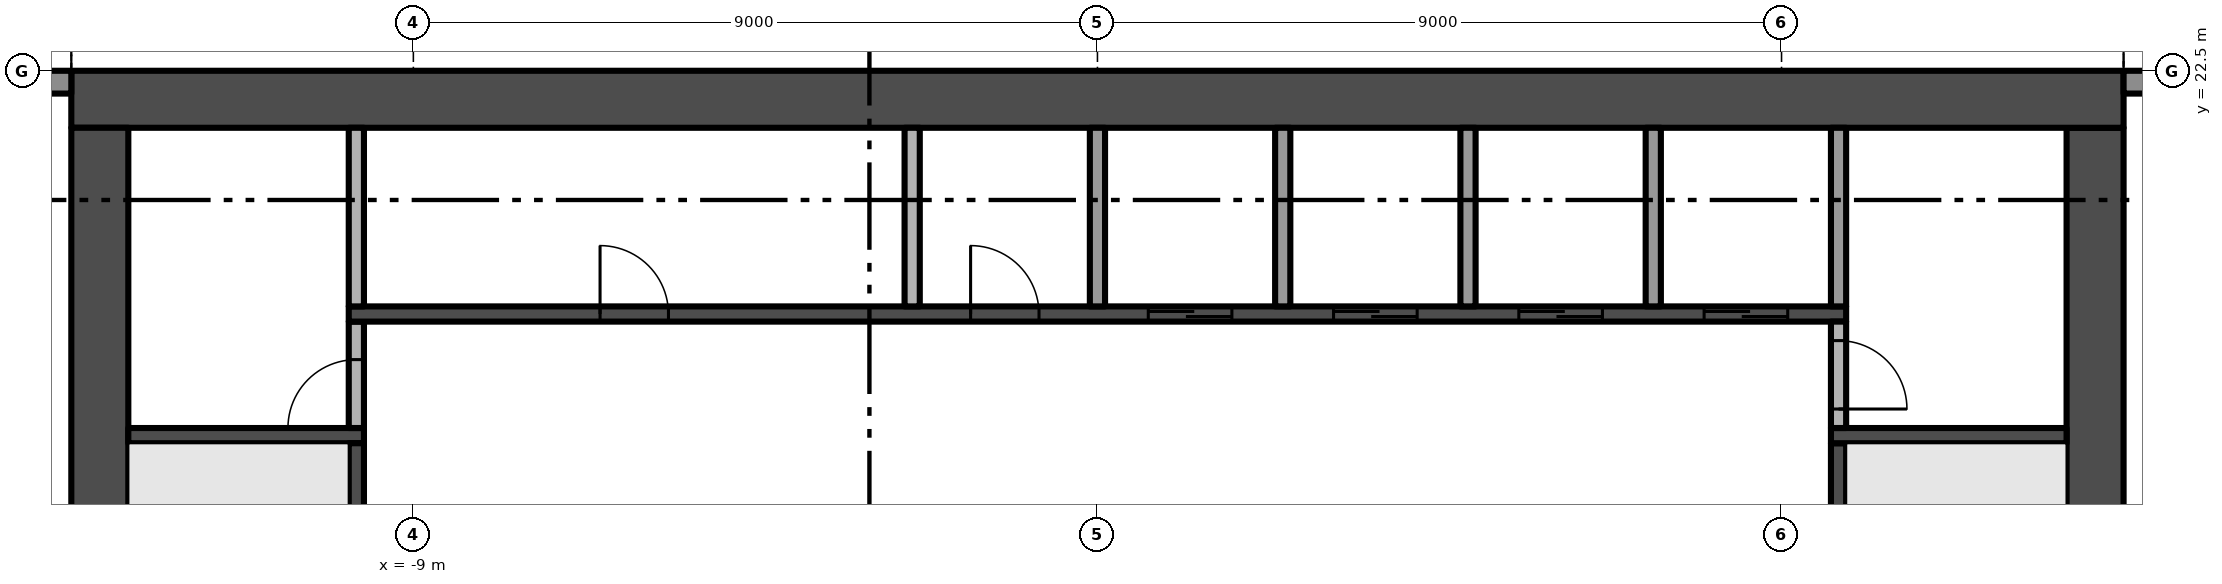
"""IFC4 building model, lengths in metres.
Left out: names, types, materials, properties, quantities, classifications, styles, units other than length and angle.
Written with IfcOpenShell. Run it as: python <this file> out.ifc"""

import sys

from ifc_helpers import new_model, si_unit, direction, frame, frame_2d, origin, place, context, subcontext, project, spatial, rectangle, extrude, element, fill, save


model = new_model("IFC4")
c1 = context("Model", 3, precision=1e-05, world=origin(), true_north=direction((0.0, 1.0)))
c2 = subcontext(c1, "Body", "Model", "MODEL_VIEW")
j1 = project(units=[si_unit("LENGTHUNIT", "METRE"), si_unit("PLANEANGLEUNIT", "RADIAN")], contexts=[c1])
p1 = place(None, origin())
s1 = spatial("IfcSite", under=j1, at=p1, CompositionType="ELEMENT")
p2 = place(p1, origin())
s2 = spatial("IfcBuilding", under=s1, at=p2, CompositionType="ELEMENT")
p3 = place(p2, frame((0.0, 0.0, 174.4)))
s3 = spatial("IfcBuildingStorey", under=s2, at=p3, CompositionType="ELEMENT", Elevation=174.4)
p4 = place(p3, frame((13.125, 5.25, -0.3), z_axis=(0.0, 0.0, 1.0), x_axis=(0.0, 1.0, 0.0)))
e1 = element("IfcWall", 1, at=p4, inside=s3, PredefinedType="SHEAR", context=c2, shape_type="SweptSolid", body=[
    extrude(rectangle(XDim=16.5, YDim=0.75, at=frame_2d((8.25, 0.0))), origin(), (0.0, 0.0, 1.0), 5.0),
])
p5 = place(p4, frame((6.15, 0.0, 0.3)))
e2 = element("IfcOpeningElement", 2, at=p5, cuts=e1, PredefinedType="OPENING", context=c2, shape_type="SweptSolid", body=[
    extrude(rectangle(XDim=1.2, YDim=2.2, at=frame_2d((0.6, 1.1))), frame((0.0, 0.385, 0.0), z_axis=(0.0, -1.0, 0.0), x_axis=(1.0, 0.0, 0.0)), (0.0, 0.0, 1.0), 0.77),
])
p6 = place(p3, frame((13.5, 22.125, -0.3), z_axis=(0.0, 0.0, 1.0), x_axis=(-1.0, 0.0, 0.0)))
e3 = element("IfcWall", 3, at=p6, inside=s3, PredefinedType="SHEAR", context=c2, shape_type="SweptSolid", body=[
    extrude(rectangle(XDim=27.0, YDim=0.75, at=frame_2d((13.5, 0.0))), origin(), (0.0, 0.0, 1.0), 5.0),
])
p7 = place(p3, frame((-13.125, 21.75, -0.3), z_axis=(0.0, 0.0, 1.0), x_axis=(0.0, -1.0, 0.0)))
e4 = element("IfcWall", 4, at=p7, inside=s3, PredefinedType="SHEAR", context=c2, shape_type="SweptSolid", body=[
    extrude(rectangle(XDim=16.5, YDim=0.75, at=frame_2d((8.25, 0.0))), origin(), (0.0, 0.0, 1.0), 5.0),
])
p8 = place(p7, frame((9.15, 0.0, 0.3)))
e5 = element("IfcOpeningElement", 5, at=p8, cuts=e4, PredefinedType="OPENING", context=c2, shape_type="SweptSolid", body=[
    extrude(rectangle(XDim=1.2, YDim=2.2, at=frame_2d((0.6, 1.1))), frame((0.0, 0.385, 0.0), z_axis=(0.0, -1.0, 0.0), x_axis=(1.0, 0.0, 0.0)), (0.0, 0.0, 1.0), 0.77),
])
p9 = place(p3, frame((13.5, 22.35, 0.0), z_axis=(0.0, 0.0, 1.0), x_axis=(1.0, 0.0, 0.0)))
e6 = element("IfcWall", 6, at=p9, inside=s3, PredefinedType="SOLIDWALL", context=c2, shape_type="SweptSolid", body=[
    extrude(rectangle(XDim=3.4, YDim=0.3, at=frame_2d((1.7, 0.0))), origin(), (0.0, 0.0, 1.0), 4.7),
])
p10 = place(p9, frame((0.65, 0.0, 0.0)))
e7 = element("IfcOpeningElement", 7, at=p10, cuts=e6, PredefinedType="OPENING", context=c2, shape_type="SweptSolid", body=[
    extrude(rectangle(XDim=2.45, YDim=2.4, at=frame_2d((1.225, 1.2))), frame((0.0, 0.16, 0.0), z_axis=(0.0, -1.0, 0.0), x_axis=(1.0, 0.0, 0.0)), (0.0, 0.0, 1.0), 0.32),
])
p11 = place(p3, frame((-16.9, 22.35, 0.0), z_axis=(0.0, 0.0, 1.0), x_axis=(1.0, 0.0, 0.0)))
e8 = element("IfcWall", 8, at=p11, inside=s3, PredefinedType="SOLIDWALL", context=c2, shape_type="SweptSolid", body=[
    extrude(rectangle(XDim=3.4, YDim=0.3, at=frame_2d((1.7, 0.0))), origin(), (0.0, 0.0, 1.0), 4.7),
])
p12 = place(p11, frame((0.3, 0.0, 0.0)))
e9 = element("IfcOpeningElement", 9, at=p12, cuts=e8, PredefinedType="OPENING", context=c2, shape_type="SweptSolid", body=[
    extrude(rectangle(XDim=2.45, YDim=2.4, at=frame_2d((1.225, 1.2))), frame((0.0, 0.16, 0.0), z_axis=(0.0, -1.0, 0.0), x_axis=(1.0, 0.0, 0.0)), (0.0, 0.0, 1.0), 0.32),
])
p13 = place(p3, frame((-12.75, 17.7, 0.0), z_axis=(0.0, 0.0, 1.0), x_axis=(1.0, 0.0, 0.0)))
e10 = element("IfcWall", 10, at=p13, inside=s3, PredefinedType="SHEAR", context=c2, shape_type="SweptSolid", body=[
    extrude(rectangle(XDim=3.1, YDim=0.2, at=frame_2d((1.55, 0.0))), origin(), (0.0, 0.0, 1.0), 4.7),
])
p14 = place(p3, frame((-9.75, 16.1, 0.0), z_axis=(0.0, 0.0, 1.0), x_axis=(0.0, 1.0, 0.0)))
e11 = element("IfcWall", 11, at=p14, inside=s3, PredefinedType="SHEAR", context=c2, shape_type="SweptSolid", body=[
    extrude(rectangle(XDim=1.5, YDim=0.2, at=frame_2d((0.75, 0.0))), origin(), (0.0, 0.0, 1.0), 4.7),
])
p15 = place(p3, frame((-9.75, 17.8, 0.0), z_axis=(0.0, 0.0, 1.0), x_axis=(0.0, 1.0, 0.0)))
e12 = element("IfcWall", 12, at=p15, inside=s3, PredefinedType="PARTITIONING", context=c2, shape_type="SweptSolid", body=[
    extrude(rectangle(XDim=1.4, YDim=0.2, at=frame_2d((0.7, 0.0))), origin(), (0.0, 0.0, 1.0), 4.7),
])
p16 = place(p15, origin())
e13 = element("IfcOpeningElement", 13, at=p16, cuts=e12, PredefinedType="OPENING", context=c2, shape_type="SweptSolid", body=[
    extrude(rectangle(XDim=0.9, YDim=2.1, at=frame_2d((0.45, 1.05))), frame((0.0, 0.11, 0.0), z_axis=(0.0, -1.0, 0.0), x_axis=(1.0, 0.0, 0.0)), (0.0, 0.0, 1.0), 0.22),
])
p17 = place(p3, frame((-9.85, 19.3, 0.0), z_axis=(0.0, 0.0, 1.0), x_axis=(1.0, 0.0, 0.0)))
e14 = element("IfcWall", 14, at=p17, inside=s3, PredefinedType="SHEAR", context=c2, shape_type="SweptSolid", body=[
    extrude(rectangle(XDim=19.7, YDim=0.2, at=frame_2d((9.85, 0.0))), origin(), (0.0, 0.0, 1.0), 4.7),
])
p18 = place(p17, frame((10.519, 0.0, 0.0)))
e15 = element("IfcOpeningElement", 15, at=p18, cuts=e14, PredefinedType="OPENING", context=c2, shape_type="SweptSolid", body=[
    extrude(rectangle(XDim=1.1, YDim=2.1, at=frame_2d((0.55, 1.05))), frame((0.0, 0.11, 0.0), z_axis=(0.0, -1.0, 0.0), x_axis=(1.0, 0.0, 0.0)), (0.0, 0.0, 1.0), 0.22),
])
p19 = place(p17, frame((12.956, 0.0, 0.0)))
e16 = element("IfcOpeningElement", 16, at=p19, cuts=e14, PredefinedType="OPENING", context=c2, shape_type="SweptSolid", body=[
    extrude(rectangle(XDim=1.1, YDim=2.1, at=frame_2d((0.55, 1.05))), frame((0.0, 0.11, 0.0), z_axis=(0.0, -1.0, 0.0), x_axis=(1.0, 0.0, 0.0)), (0.0, 0.0, 1.0), 0.22),
])
p20 = place(p17, frame((15.394, 0.0, 0.0)))
e17 = element("IfcOpeningElement", 17, at=p20, cuts=e14, PredefinedType="OPENING", context=c2, shape_type="SweptSolid", body=[
    extrude(rectangle(XDim=1.1, YDim=2.1, at=frame_2d((0.55, 1.05))), frame((0.0, 0.11, 0.0), z_axis=(0.0, -1.0, 0.0), x_axis=(1.0, 0.0, 0.0)), (0.0, 0.0, 1.0), 0.22),
])
p21 = place(p17, frame((17.831, 0.0, 0.0)))
e18 = element("IfcOpeningElement", 18, at=p21, cuts=e14, PredefinedType="OPENING", context=c2, shape_type="SweptSolid", body=[
    extrude(rectangle(XDim=1.1, YDim=2.1, at=frame_2d((0.55, 1.05))), frame((0.0, 0.11, 0.0), z_axis=(0.0, -1.0, 0.0), x_axis=(1.0, 0.0, 0.0)), (0.0, 0.0, 1.0), 0.22),
])
p22 = place(p17, frame((3.306, 0.0, 0.0)))
e19 = element("IfcOpeningElement", 19, at=p22, cuts=e14, PredefinedType="OPENING", context=c2, shape_type="SweptSolid", body=[
    extrude(rectangle(XDim=0.9, YDim=2.1, at=frame_2d((0.45, 1.05))), frame((0.0, 0.11, 0.0), z_axis=(0.0, -1.0, 0.0), x_axis=(1.0, 0.0, 0.0)), (0.0, 0.0, 1.0), 0.22),
])
p23 = place(p17, frame((8.181, 0.0, 0.0)))
e20 = element("IfcOpeningElement", 20, at=p23, cuts=e14, PredefinedType="OPENING", context=c2, shape_type="SweptSolid", body=[
    extrude(rectangle(XDim=0.9, YDim=2.1, at=frame_2d((0.45, 1.05))), frame((0.0, 0.11, 0.0), z_axis=(0.0, -1.0, 0.0), x_axis=(1.0, 0.0, 0.0)), (0.0, 0.0, 1.0), 0.22),
])
for number, where, z_axis, x_axis in (
    (21, (-9.75, 19.4, 0.0), (0.0, 0.0, 1.0), (0.0, 1.0, 0.0)),
    (22, (-2.438, 19.4, 0.0), (0.0, 0.0, 1.0), (0.0, 1.0, 0.0)),
    (23, (0.0, 19.4, 0.0), (0.0, 0.0, 1.0), (0.0, 1.0, 0.0)),
    (24, (2.438, 19.4, 0.0), (0.0, 0.0, 1.0), (0.0, 1.0, 0.0)),
    (25, (4.875, 19.4, 0.0), (0.0, 0.0, 1.0), (0.0, 1.0, 0.0)),
    (26, (7.312, 19.4, 0.0), (0.0, 0.0, 1.0), (0.0, 1.0, 0.0)),
):
    element("IfcWall", number, at=place(p3, frame(where, z_axis=z_axis, x_axis=x_axis)), inside=s3, PredefinedType="PARTITIONING", context=c2, shape_type="SweptSolid", body=[
        extrude(rectangle(XDim=2.35, YDim=0.2, at=frame_2d((1.175, 0.0))), origin(), (0.0, 0.0, 1.0), 4.7),
    ])
p24 = place(p3, frame((9.75, 16.1, 0.0), z_axis=(0.0, 0.0, 1.0), x_axis=(0.0, 1.0, 0.0)))
e27 = element("IfcWall", 27, at=p24, inside=s3, PredefinedType="SHEAR", context=c2, shape_type="SweptSolid", body=[
    extrude(rectangle(XDim=1.5, YDim=0.2, at=frame_2d((0.75, 0.0))), origin(), (0.0, 0.0, 1.0), 4.7),
])
p25 = place(p3, frame((9.65, 17.7, 0.0), z_axis=(0.0, 0.0, 1.0), x_axis=(1.0, 0.0, 0.0)))
e28 = element("IfcWall", 28, at=p25, inside=s3, PredefinedType="SHEAR", context=c2, shape_type="SweptSolid", body=[
    extrude(rectangle(XDim=3.1, YDim=0.2, at=frame_2d((1.55, 0.0))), origin(), (0.0, 0.0, 1.0), 4.7),
])
p26 = place(p3, frame((9.75, 19.2, 0.0), z_axis=(0.0, 0.0, 1.0), x_axis=(0.0, -1.0, 0.0)))
e29 = element("IfcWall", 29, at=p26, inside=s3, PredefinedType="PARTITIONING", context=c2, shape_type="SweptSolid", body=[
    extrude(rectangle(XDim=1.4, YDim=0.2, at=frame_2d((0.7, 0.0))), origin(), (0.0, 0.0, 1.0), 4.7),
])
p27 = place(p26, frame((0.25, 0.0, 0.0)))
e30 = element("IfcOpeningElement", 30, at=p27, cuts=e29, PredefinedType="OPENING", context=c2, shape_type="SweptSolid", body=[
    extrude(rectangle(XDim=0.9, YDim=2.1, at=frame_2d((0.45, 1.05))), frame((0.0, 0.11, 0.0), z_axis=(0.0, -1.0, 0.0), x_axis=(1.0, 0.0, 0.0)), (0.0, 0.0, 1.0), 0.22),
])
p28 = place(p3, frame((9.75, 19.4, 0.0), z_axis=(0.0, 0.0, 1.0), x_axis=(0.0, 1.0, 0.0)))
e31 = element("IfcWall", 31, at=p28, inside=s3, PredefinedType="PARTITIONING", context=c2, shape_type="SweptSolid", body=[
    extrude(rectangle(XDim=2.35, YDim=0.2, at=frame_2d((1.175, 0.0))), origin(), (0.0, 0.0, 1.0), 4.7),
])
p29 = place(p18, origin())
e32 = element("IfcDoor", 32, at=p29, inside=s3, OperationType="SLIDING_TO_RIGHT", PredefinedType="DOOR", context=c2, shape_type="SweptSolid", body=[
    extrude(rectangle(XDim=1.1, YDim=2.1, at=frame_2d((0.55, 1.05))), frame((0.0, 0.025, 0.0), z_axis=(0.0, -1.0, 0.0), x_axis=(1.0, 0.0, 0.0)), (0.0, 0.0, 1.0), 0.05),
])
fill(e15, e32)
p30 = place(p19, origin())
e33 = element("IfcDoor", 33, at=p30, inside=s3, OperationType="SLIDING_TO_RIGHT", PredefinedType="DOOR", context=c2, shape_type="SweptSolid", body=[
    extrude(rectangle(XDim=1.1, YDim=2.1, at=frame_2d((0.55, 1.05))), frame((0.0, 0.025, 0.0), z_axis=(0.0, -1.0, 0.0), x_axis=(1.0, 0.0, 0.0)), (0.0, 0.0, 1.0), 0.05),
])
fill(e16, e33)
p31 = place(p20, origin())
e34 = element("IfcDoor", 34, at=p31, inside=s3, OperationType="SLIDING_TO_RIGHT", PredefinedType="DOOR", context=c2, shape_type="SweptSolid", body=[
    extrude(rectangle(XDim=1.1, YDim=2.1, at=frame_2d((0.55, 1.05))), frame((0.0, 0.025, 0.0), z_axis=(0.0, -1.0, 0.0), x_axis=(1.0, 0.0, 0.0)), (0.0, 0.0, 1.0), 0.05),
])
fill(e17, e34)
p32 = place(p21, origin())
e35 = element("IfcDoor", 35, at=p32, inside=s3, OperationType="SLIDING_TO_RIGHT", PredefinedType="DOOR", context=c2, shape_type="SweptSolid", body=[
    extrude(rectangle(XDim=1.1, YDim=2.1, at=frame_2d((0.55, 1.05))), frame((0.0, 0.025, 0.0), z_axis=(0.0, -1.0, 0.0), x_axis=(1.0, 0.0, 0.0)), (0.0, 0.0, 1.0), 0.05),
])
fill(e18, e35)
p33 = place(p16, origin())
e36 = element("IfcDoor", 36, at=p33, inside=s3, OperationType="SINGLE_SWING_LEFT", PredefinedType="DOOR", context=c2, shape_type="SweptSolid", body=[
    extrude(rectangle(XDim=0.9, YDim=2.1, at=frame_2d((0.45, 1.05))), frame((0.0, 0.025, 0.0), z_axis=(0.0, -1.0, 0.0), x_axis=(1.0, 0.0, 0.0)), (0.0, 0.0, 1.0), 0.05),
])
fill(e13, e36)
p34 = place(p27, origin())
e37 = element("IfcDoor", 37, at=p34, inside=s3, OperationType="SINGLE_SWING_RIGHT", PredefinedType="DOOR", context=c2, shape_type="SweptSolid", body=[
    extrude(rectangle(XDim=0.9, YDim=2.1, at=frame_2d((0.45, 1.05))), frame((0.0, 0.025, 0.0), z_axis=(0.0, -1.0, 0.0), x_axis=(1.0, 0.0, 0.0)), (0.0, 0.0, 1.0), 0.05),
])
fill(e30, e37)
p35 = place(p22, origin())
e38 = element("IfcDoor", 38, at=p35, inside=s3, OperationType="SINGLE_SWING_LEFT", PredefinedType="DOOR", context=c2, shape_type="SweptSolid", body=[
    extrude(rectangle(XDim=0.9, YDim=2.1, at=frame_2d((0.45, 1.05))), frame((0.0, 0.025, 0.0), z_axis=(0.0, -1.0, 0.0), x_axis=(1.0, 0.0, 0.0)), (0.0, 0.0, 1.0), 0.05),
])
fill(e19, e38)
p36 = place(p23, origin())
e39 = element("IfcDoor", 39, at=p36, inside=s3, OperationType="SINGLE_SWING_LEFT", PredefinedType="DOOR", context=c2, shape_type="SweptSolid", body=[
    extrude(rectangle(XDim=0.9, YDim=2.1, at=frame_2d((0.45, 1.05))), frame((0.0, 0.025, 0.0), z_axis=(0.0, -1.0, 0.0), x_axis=(1.0, 0.0, 0.0)), (0.0, 0.0, 1.0), 0.05),
])
fill(e20, e39)
save(model, sys.argv[1])
